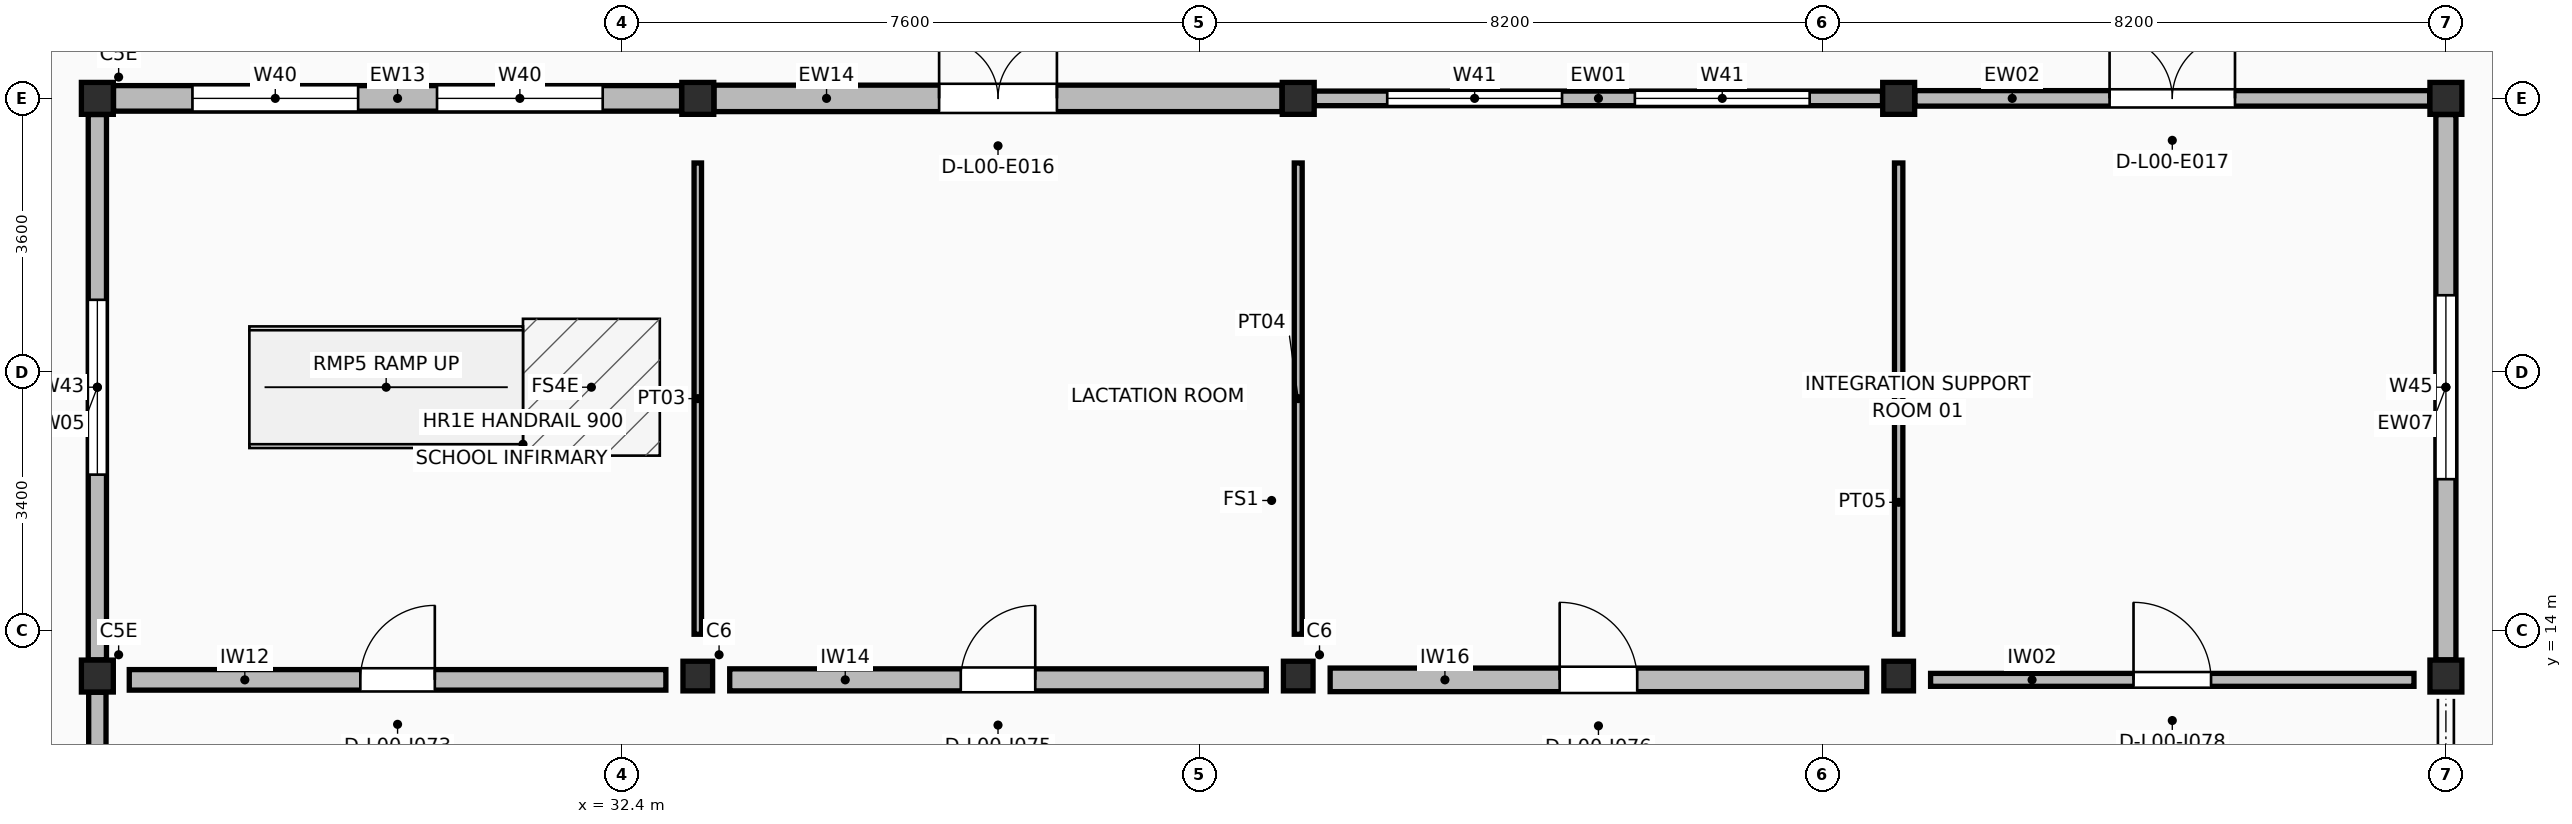
"""IFC4 building model, lengths in metres.
Left out: names, types, materials, properties, quantities, classifications, styles, units other than length and angle.
Written with IfcOpenShell. Run it as: python <this file> out.ifc"""

import sys

from ifc_helpers import new_model, si_unit, direction, frame, frame_2d, origin, origin_2d, place, context, subcontext, project, spatial, rectangle, extrude, element, fill, save


model = new_model("IFC4")
c1 = context("Model", 3, precision=1e-05, world=origin(), true_north=direction((0.0, 1.0)))
c2 = subcontext(c1, "Body", "Model", "MODEL_VIEW")
j1 = project(units=[si_unit("LENGTHUNIT", "METRE"), si_unit("PLANEANGLEUNIT", "RADIAN")], contexts=[c1])
p1 = place(None, origin())
s1 = spatial("IfcSite", under=j1, at=p1, CompositionType="ELEMENT")
p2 = place(p1, origin())
s2 = spatial("IfcBuilding", under=s1, at=p2, CompositionType="ELEMENT")
p3 = place(p2, origin())
s3 = spatial("IfcBuildingStorey", under=s2, at=p3, CompositionType="ELEMENT", Elevation=0.0)
for number, where, z_axis, x_axis in (
    (1, (25.5, 13.4, 0.0), (0.0, 0.0, 1.0), (1.0, 0.0, 0.0)),
    (2, (25.5, 21.0, 0.0), (0.0, 0.0, 1.0), (1.0, 0.0, 0.0)),
):
    element("IfcColumn", number, at=place(p3, frame(where, z_axis=z_axis, x_axis=x_axis)), inside=s3, PredefinedType="COLUMN", context=c2, shape_type="SweptSolid", body=[
        extrude(rectangle(XDim=0.42, YDim=0.42, at=origin_2d()), origin(), (0.0, 0.0, 1.0), 4.42),
    ])
p4 = place(p3, frame((33.4, 13.4, 0.0), z_axis=(0.0, 0.0, 1.0), x_axis=(1.0, 0.0, 0.0)))
e3 = element("IfcColumn", 3, at=p4, inside=s3, PredefinedType="COLUMN", context=c2, shape_type="SweptSolid", body=[
    extrude(rectangle(XDim=0.39, YDim=0.39, at=origin_2d()), origin(), (0.0, 0.0, 1.0), 4.42),
])
p5 = place(p3, frame((33.4, 21.0, 0.0), z_axis=(0.0, 0.0, 1.0), x_axis=(1.0, 0.0, 0.0)))
e4 = element("IfcColumn", 4, at=p5, inside=s3, PredefinedType="COLUMN", context=c2, shape_type="SweptSolid", body=[
    extrude(rectangle(XDim=0.42, YDim=0.42, at=origin_2d()), origin(), (0.0, 0.0, 1.0), 4.42),
])
p6 = place(p3, frame((41.3, 13.4, 0.0), z_axis=(0.0, 0.0, 1.0), x_axis=(1.0, 0.0, 0.0)))
e5 = element("IfcColumn", 5, at=p6, inside=s3, PredefinedType="COLUMN", context=c2, shape_type="SweptSolid", body=[
    extrude(rectangle(XDim=0.39, YDim=0.39, at=origin_2d()), origin(), (0.0, 0.0, 1.0), 4.42),
])
p7 = place(p3, frame((41.3, 21.0, 0.0), z_axis=(0.0, 0.0, 1.0), x_axis=(1.0, 0.0, 0.0)))
e6 = element("IfcColumn", 6, at=p7, inside=s3, PredefinedType="COLUMN", context=c2, shape_type="SweptSolid", body=[
    extrude(rectangle(XDim=0.42, YDim=0.42, at=origin_2d()), origin(), (0.0, 0.0, 1.0), 4.42),
])
p8 = place(p3, frame((49.2, 13.4, 0.0), z_axis=(0.0, 0.0, 1.0), x_axis=(1.0, 0.0, 0.0)))
e7 = element("IfcColumn", 7, at=p8, inside=s3, PredefinedType="COLUMN", context=c2, shape_type="SweptSolid", body=[
    extrude(rectangle(XDim=0.39, YDim=0.39, at=origin_2d()), origin(), (0.0, 0.0, 1.0), 4.42),
])
for number, where, z_axis, x_axis in (
    (8, (49.2, 21.0, 0.0), (0.0, 0.0, 1.0), (1.0, 0.0, 0.0)),
    (9, (56.4, 13.4, 0.0), (0.0, 0.0, 1.0), (1.0, 0.0, 0.0)),
    (10, (56.4, 21.0, 0.0), (0.0, 0.0, 1.0), (1.0, 0.0, 0.0)),
):
    element("IfcColumn", number, at=place(p3, frame(where, z_axis=z_axis, x_axis=x_axis)), inside=s3, PredefinedType="COLUMN", context=c2, shape_type="SweptSolid", body=[
        extrude(rectangle(XDim=0.42, YDim=0.42, at=origin_2d()), origin(), (0.0, 0.0, 1.0), 4.42),
    ])
p9 = place(p3, frame((25.713, 21.0, 0.0), z_axis=(0.0, 0.0, 1.0), x_axis=(1.0, 0.0, 0.0)))
e11 = element("IfcWall", 11, at=p9, inside=s3, PredefinedType="STANDARD", context=c2, shape_type="SweptSolid", body=[
    extrude(rectangle(XDim=7.474, YDim=0.336, at=frame_2d((3.737, 0.0))), origin(), (0.0, 0.0, 1.0), 3.4),
])
p10 = place(p9, frame((1.038, 0.0, 0.95)))
e12 = element("IfcOpeningElement", 12, at=p10, cuts=e11, PredefinedType="OPENING", context=c2, shape_type="SweptSolid", body=[
    extrude(rectangle(XDim=2.18, YDim=1.6, at=frame_2d((1.09, 0.8))), frame((0.0, 0.178, 0.0), z_axis=(0.0, -1.0, 0.0), x_axis=(1.0, 0.0, 0.0)), (0.0, 0.0, 1.0), 0.356),
])
p11 = place(p9, frame((4.256, 0.0, 0.95)))
e13 = element("IfcOpeningElement", 13, at=p11, cuts=e11, PredefinedType="OPENING", context=c2, shape_type="SweptSolid", body=[
    extrude(rectangle(XDim=2.18, YDim=1.6, at=frame_2d((1.09, 0.8))), frame((0.0, 0.178, 0.0), z_axis=(0.0, -1.0, 0.0), x_axis=(1.0, 0.0, 0.0)), (0.0, 0.0, 1.0), 0.356),
])
p12 = place(p3, frame((33.613, 21.0, 0.0), z_axis=(0.0, 0.0, 1.0), x_axis=(1.0, 0.0, 0.0)))
e14 = element("IfcWall", 14, at=p12, inside=s3, PredefinedType="STANDARD", context=c2, shape_type="SweptSolid", body=[
    extrude(rectangle(XDim=7.474, YDim=0.348, at=frame_2d((3.737, 0.0))), origin(), (0.0, 0.0, 1.0), 3.4),
])
p13 = place(p12, frame((2.962, 0.0, 0.0)))
e15 = element("IfcOpeningElement", 15, at=p13, cuts=e14, PredefinedType="OPENING", context=c2, shape_type="SweptSolid", body=[
    extrude(rectangle(XDim=1.55, YDim=2.22, at=frame_2d((0.775, 1.11))), frame((0.0, 0.184, 0.0), z_axis=(0.0, -1.0, 0.0), x_axis=(1.0, 0.0, 0.0)), (0.0, 0.0, 1.0), 0.368),
])
p14 = place(p3, frame((41.513, 21.0, 0.0), z_axis=(0.0, 0.0, 1.0), x_axis=(1.0, 0.0, 0.0)))
e16 = element("IfcWall", 16, at=p14, inside=s3, PredefinedType="STANDARD", context=c2, shape_type="SweptSolid", body=[
    extrude(rectangle(XDim=7.474, YDim=0.192, at=frame_2d((3.737, 0.0))), origin(), (0.0, 0.0, 1.0), 3.4),
])
p15 = place(p14, frame((0.958, 0.0, 0.95)))
e17 = element("IfcOpeningElement", 17, at=p15, cuts=e16, PredefinedType="OPENING", context=c2, shape_type="SweptSolid", body=[
    extrude(rectangle(XDim=2.3, YDim=1.15, at=frame_2d((1.15, 0.575))), frame((0.0, 0.106, 0.0), z_axis=(0.0, -1.0, 0.0), x_axis=(1.0, 0.0, 0.0)), (0.0, 0.0, 1.0), 0.212),
])
p16 = place(p14, frame((4.216, 0.0, 0.95)))
e18 = element("IfcOpeningElement", 18, at=p16, cuts=e16, PredefinedType="OPENING", context=c2, shape_type="SweptSolid", body=[
    extrude(rectangle(XDim=2.3, YDim=1.15, at=frame_2d((1.15, 0.575))), frame((0.0, 0.106, 0.0), z_axis=(0.0, -1.0, 0.0), x_axis=(1.0, 0.0, 0.0)), (0.0, 0.0, 1.0), 0.212),
])
p17 = place(p3, frame((49.413, 21.0, 0.0), z_axis=(0.0, 0.0, 1.0), x_axis=(1.0, 0.0, 0.0)))
e19 = element("IfcWall", 19, at=p17, inside=s3, PredefinedType="STANDARD", context=c2, shape_type="SweptSolid", body=[
    extrude(rectangle(XDim=6.774, YDim=0.204, at=frame_2d((3.387, 0.0))), origin(), (0.0, 0.0, 1.0), 3.4),
])
p18 = place(p17, frame((2.562, 0.0, 0.0)))
e20 = element("IfcOpeningElement", 20, at=p18, cuts=e19, PredefinedType="OPENING", context=c2, shape_type="SweptSolid", body=[
    extrude(rectangle(XDim=1.65, YDim=2.25, at=frame_2d((0.825, 1.125))), frame((0.0, 0.112, 0.0), z_axis=(0.0, -1.0, 0.0), x_axis=(1.0, 0.0, 0.0)), (0.0, 0.0, 1.0), 0.224),
])
p19 = place(p3, frame((25.5, 10.413, 0.0), z_axis=(0.0, 0.0, 1.0), x_axis=(0.0, 1.0, 0.0)))
e21 = element("IfcWall", 21, at=p19, inside=s3, PredefinedType="STANDARD", context=c2, shape_type="SweptSolid", body=[
    extrude(rectangle(XDim=2.774, YDim=0.228, at=frame_2d((1.387, 0.0))), origin(), (0.0, 0.0, 1.0), 3.4),
])
p20 = place(p19, frame((0.857, 0.0, 0.0)))
e22 = element("IfcOpeningElement", 22, at=p20, cuts=e21, PredefinedType="OPENING", context=c2, shape_type="SweptSolid", body=[
    extrude(rectangle(XDim=1.06, YDim=2.18, at=frame_2d((0.53, 1.09))), frame((0.0, 0.124, 0.0), z_axis=(0.0, -1.0, 0.0), x_axis=(1.0, 0.0, 0.0)), (0.0, 0.0, 1.0), 0.248),
])
p21 = place(p3, frame((25.5, 13.613, 0.0), z_axis=(0.0, 0.0, 1.0), x_axis=(0.0, 1.0, 0.0)))
e23 = element("IfcWall", 23, at=p21, inside=s3, PredefinedType="STANDARD", context=c2, shape_type="SweptSolid", body=[
    extrude(rectangle(XDim=7.174, YDim=0.24, at=frame_2d((3.587, 0.0))), origin(), (0.0, 0.0, 1.0), 3.4),
])
p22 = place(p21, frame((2.437, 0.0, 0.95)))
e24 = element("IfcOpeningElement", 24, at=p22, cuts=e23, PredefinedType="OPENING", context=c2, shape_type="SweptSolid", body=[
    extrude(rectangle(XDim=2.3, YDim=1.45, at=frame_2d((1.15, 0.725))), frame((0.0, 0.13, 0.0), z_axis=(0.0, -1.0, 0.0), x_axis=(1.0, 0.0, 0.0)), (0.0, 0.0, 1.0), 0.26),
])
p23 = place(p3, frame((56.4, 13.613, 0.0), z_axis=(0.0, 0.0, 1.0), x_axis=(0.0, 1.0, 0.0)))
e25 = element("IfcWall", 25, at=p23, inside=s3, PredefinedType="STANDARD", context=c2, shape_type="SweptSolid", body=[
    extrude(rectangle(XDim=7.174, YDim=0.264, at=frame_2d((3.587, 0.0))), origin(), (0.0, 0.0, 1.0), 3.4),
])
p24 = place(p23, frame((2.377, 0.0, 0.95)))
e26 = element("IfcOpeningElement", 26, at=p24, cuts=e25, PredefinedType="OPENING", context=c2, shape_type="SweptSolid", body=[
    extrude(rectangle(XDim=2.42, YDim=1.15, at=frame_2d((1.21, 0.575))), frame((0.0, 0.142, 0.0), z_axis=(0.0, -1.0, 0.0), x_axis=(1.0, 0.0, 0.0)), (0.0, 0.0, 1.0), 0.284),
])
p25 = place(p3, frame((25.92, 13.35, 0.0), z_axis=(0.0, 0.0, 1.0), x_axis=(1.0, 0.0, 0.0)))
e27 = element("IfcWall", 27, at=p25, inside=s3, PredefinedType="STANDARD", context=c2, shape_type="SweptSolid", body=[
    extrude(rectangle(XDim=7.06, YDim=0.27, at=frame_2d((3.53, 0.0))), origin(), (0.0, 0.0, 1.0), 3.38),
])
p26 = place(p25, frame((3.04, 0.0, 0.0)))
e28 = element("IfcOpeningElement", 28, at=p26, cuts=e27, PredefinedType="OPENING", context=c2, shape_type="SweptSolid", body=[
    extrude(rectangle(XDim=0.98, YDim=2.12, at=frame_2d((0.49, 1.06))), frame((0.0, 0.145, 0.0), z_axis=(0.0, -1.0, 0.0), x_axis=(1.0, 0.0, 0.0)), (0.0, 0.0, 1.0), 0.29),
])
p27 = place(p3, frame((33.82, 13.35, 0.0), z_axis=(0.0, 0.0, 1.0), x_axis=(1.0, 0.0, 0.0)))
e29 = element("IfcWall", 29, at=p27, inside=s3, PredefinedType="STANDARD", context=c2, shape_type="SweptSolid", body=[
    extrude(rectangle(XDim=7.06, YDim=0.29, at=frame_2d((3.53, 0.0))), origin(), (0.0, 0.0, 1.0), 3.38),
])
p28 = place(p27, frame((3.04, 0.0, 0.0)))
e30 = element("IfcOpeningElement", 30, at=p28, cuts=e29, PredefinedType="OPENING", context=c2, shape_type="SweptSolid", body=[
    extrude(rectangle(XDim=0.98, YDim=2.24, at=frame_2d((0.49, 1.12))), frame((0.0, 0.155, 0.0), z_axis=(0.0, -1.0, 0.0), x_axis=(1.0, 0.0, 0.0)), (0.0, 0.0, 1.0), 0.31),
])
p29 = place(p3, frame((41.72, 13.35, 0.0), z_axis=(0.0, 0.0, 1.0), x_axis=(1.0, 0.0, 0.0)))
e31 = element("IfcWall", 31, at=p29, inside=s3, PredefinedType="STANDARD", context=c2, shape_type="SweptSolid", body=[
    extrude(rectangle(XDim=7.06, YDim=0.31, at=frame_2d((3.53, 0.0))), origin(), (0.0, 0.0, 1.0), 3.38),
])
p30 = place(p29, frame((3.02, 0.0, 0.0)))
e32 = element("IfcOpeningElement", 32, at=p30, cuts=e31, PredefinedType="OPENING", context=c2, shape_type="SweptSolid", body=[
    extrude(rectangle(XDim=1.02, YDim=2.06, at=frame_2d((0.51, 1.03))), frame((0.0, 0.165, 0.0), z_axis=(0.0, -1.0, 0.0), x_axis=(1.0, 0.0, 0.0)), (0.0, 0.0, 1.0), 0.33),
])
p31 = place(p3, frame((49.62, 13.35, 0.0), z_axis=(0.0, 0.0, 1.0), x_axis=(1.0, 0.0, 0.0)))
e33 = element("IfcWall", 33, at=p31, inside=s3, PredefinedType="STANDARD", context=c2, shape_type="SweptSolid", body=[
    extrude(rectangle(XDim=6.36, YDim=0.17, at=frame_2d((3.18, 0.0))), origin(), (0.0, 0.0, 1.0), 3.38),
])
p32 = place(p31, frame((2.67, 0.0, 0.0)))
e34 = element("IfcOpeningElement", 34, at=p32, cuts=e33, PredefinedType="OPENING", context=c2, shape_type="SweptSolid", body=[
    extrude(rectangle(XDim=1.02, YDim=2.18, at=frame_2d((0.51, 1.09))), frame((0.0, 0.095, 0.0), z_axis=(0.0, -1.0, 0.0), x_axis=(1.0, 0.0, 0.0)), (0.0, 0.0, 1.0), 0.19),
])
p33 = place(p3, frame((33.4, 13.95, 0.0), z_axis=(0.0, 0.0, 1.0), x_axis=(0.0, 1.0, 0.0)))
e35 = element("IfcWall", 35, at=p33, inside=s3, PredefinedType="PARTITIONING", context=c2, shape_type="SweptSolid", body=[
    extrude(rectangle(XDim=6.2, YDim=0.098, at=frame_2d((3.1, 0.0))), origin(), (0.0, 0.0, 1.0), 3.38),
])
p34 = place(p3, frame((41.3, 13.95, 0.0), z_axis=(0.0, 0.0, 1.0), x_axis=(0.0, 1.0, 0.0)))
e36 = element("IfcWall", 36, at=p34, inside=s3, PredefinedType="PARTITIONING", context=c2, shape_type="SweptSolid", body=[
    extrude(rectangle(XDim=6.2, YDim=0.104, at=frame_2d((3.1, 0.0))), origin(), (0.0, 0.0, 1.0), 3.38),
])
p35 = place(p3, frame((49.2, 13.95, 0.0), z_axis=(0.0, 0.0, 1.0), x_axis=(0.0, 1.0, 0.0)))
e37 = element("IfcWall", 37, at=p35, inside=s3, PredefinedType="PARTITIONING", context=c2, shape_type="SweptSolid", body=[
    extrude(rectangle(XDim=6.2, YDim=0.11, at=frame_2d((3.1, 0.0))), origin(), (0.0, 0.0, 1.0), 3.38),
])
p36 = place(p10, origin())
e38 = element("IfcWindow", 38, at=p36, inside=s3, PartitioningType="SINGLE_PANEL", PredefinedType="WINDOW", context=c2, shape_type="SweptSolid", body=[
    extrude(rectangle(XDim=2.18, YDim=1.6, at=frame_2d((1.09, 0.8))), frame((0.0, 0.03, 0.0), z_axis=(0.0, -1.0, 0.0), x_axis=(1.0, 0.0, 0.0)), (0.0, 0.0, 1.0), 0.06),
])
fill(e12, e38)
p37 = place(p11, origin())
e39 = element("IfcWindow", 39, at=p37, inside=s3, PartitioningType="SINGLE_PANEL", PredefinedType="WINDOW", context=c2, shape_type="SweptSolid", body=[
    extrude(rectangle(XDim=2.18, YDim=1.6, at=frame_2d((1.09, 0.8))), frame((0.0, 0.03, 0.0), z_axis=(0.0, -1.0, 0.0), x_axis=(1.0, 0.0, 0.0)), (0.0, 0.0, 1.0), 0.06),
])
fill(e13, e39)
p38 = place(p13, origin())
e40 = element("IfcDoor", 40, at=p38, inside=s3, OperationType="DOUBLE_DOOR_SINGLE_SWING", PredefinedType="DOOR", context=c2, shape_type="SweptSolid", body=[
    extrude(rectangle(XDim=1.55, YDim=2.22, at=frame_2d((0.775, 1.11))), frame((0.0, 0.025, 0.0), z_axis=(0.0, -1.0, 0.0), x_axis=(1.0, 0.0, 0.0)), (0.0, 0.0, 1.0), 0.05),
])
fill(e15, e40)
p39 = place(p15, origin())
e41 = element("IfcWindow", 41, at=p39, inside=s3, PartitioningType="SINGLE_PANEL", PredefinedType="WINDOW", context=c2, shape_type="SweptSolid", body=[
    extrude(rectangle(XDim=2.3, YDim=1.15, at=frame_2d((1.15, 0.575))), frame((0.0, 0.03, 0.0), z_axis=(0.0, -1.0, 0.0), x_axis=(1.0, 0.0, 0.0)), (0.0, 0.0, 1.0), 0.06),
])
fill(e17, e41)
p40 = place(p16, origin())
e42 = element("IfcWindow", 42, at=p40, inside=s3, PartitioningType="SINGLE_PANEL", PredefinedType="WINDOW", context=c2, shape_type="SweptSolid", body=[
    extrude(rectangle(XDim=2.3, YDim=1.15, at=frame_2d((1.15, 0.575))), frame((0.0, 0.03, 0.0), z_axis=(0.0, -1.0, 0.0), x_axis=(1.0, 0.0, 0.0)), (0.0, 0.0, 1.0), 0.06),
])
fill(e18, e42)
p41 = place(p18, origin())
e43 = element("IfcDoor", 43, at=p41, inside=s3, OperationType="DOUBLE_DOOR_SINGLE_SWING", PredefinedType="DOOR", context=c2, shape_type="SweptSolid", body=[
    extrude(rectangle(XDim=1.65, YDim=2.25, at=frame_2d((0.825, 1.125))), frame((0.0, 0.025, 0.0), z_axis=(0.0, -1.0, 0.0), x_axis=(1.0, 0.0, 0.0)), (0.0, 0.0, 1.0), 0.05),
])
fill(e20, e43)
p42 = place(p22, origin())
e44 = element("IfcWindow", 44, at=p42, inside=s3, PartitioningType="SINGLE_PANEL", PredefinedType="WINDOW", context=c2, shape_type="SweptSolid", body=[
    extrude(rectangle(XDim=2.3, YDim=1.45, at=frame_2d((1.15, 0.725))), frame((0.0, 0.03, 0.0), z_axis=(0.0, -1.0, 0.0), x_axis=(1.0, 0.0, 0.0)), (0.0, 0.0, 1.0), 0.06),
])
fill(e24, e44)
p43 = place(p24, origin())
e45 = element("IfcWindow", 45, at=p43, inside=s3, PartitioningType="SINGLE_PANEL", PredefinedType="WINDOW", context=c2, shape_type="SweptSolid", body=[
    extrude(rectangle(XDim=2.42, YDim=1.15, at=frame_2d((1.21, 0.575))), frame((0.0, 0.03, 0.0), z_axis=(0.0, -1.0, 0.0), x_axis=(1.0, 0.0, 0.0)), (0.0, 0.0, 1.0), 0.06),
])
fill(e26, e45)
p44 = place(p26, frame((0.98, 0.0, 0.0), z_axis=(0.0, 0.0, 1.0), x_axis=(-1.0, 0.0, 0.0)))
e46 = element("IfcDoor", 46, at=p44, inside=s3, OperationType="SINGLE_SWING_RIGHT", PredefinedType="DOOR", context=c2, shape_type="SweptSolid", body=[
    extrude(rectangle(XDim=0.98, YDim=2.12, at=frame_2d((0.49, 1.06))), frame((0.0, 0.025, 0.0), z_axis=(0.0, -1.0, 0.0), x_axis=(1.0, 0.0, 0.0)), (0.0, 0.0, 1.0), 0.05),
])
fill(e28, e46)
p45 = place(p28, frame((0.98, 0.0, 0.0), z_axis=(0.0, 0.0, 1.0), x_axis=(-1.0, 0.0, 0.0)))
e47 = element("IfcDoor", 47, at=p45, inside=s3, OperationType="SINGLE_SWING_RIGHT", PredefinedType="DOOR", context=c2, shape_type="SweptSolid", body=[
    extrude(rectangle(XDim=0.98, YDim=2.24, at=frame_2d((0.49, 1.12))), frame((0.0, 0.025, 0.0), z_axis=(0.0, -1.0, 0.0), x_axis=(1.0, 0.0, 0.0)), (0.0, 0.0, 1.0), 0.05),
])
fill(e30, e47)
p46 = place(p30, frame((1.02, 0.0, 0.0), z_axis=(0.0, 0.0, 1.0), x_axis=(-1.0, 0.0, 0.0)))
e48 = element("IfcDoor", 48, at=p46, inside=s3, OperationType="SINGLE_SWING_LEFT", PredefinedType="DOOR", context=c2, shape_type="SweptSolid", body=[
    extrude(rectangle(XDim=1.02, YDim=2.06, at=frame_2d((0.51, 1.03))), frame((0.0, 0.025, 0.0), z_axis=(0.0, -1.0, 0.0), x_axis=(1.0, 0.0, 0.0)), (0.0, 0.0, 1.0), 0.05),
])
fill(e32, e48)
p47 = place(p32, frame((1.02, 0.0, 0.0), z_axis=(0.0, 0.0, 1.0), x_axis=(-1.0, 0.0, 0.0)))
e49 = element("IfcDoor", 49, at=p47, inside=s3, OperationType="SINGLE_SWING_LEFT", PredefinedType="DOOR", context=c2, shape_type="SweptSolid", body=[
    extrude(rectangle(XDim=1.02, YDim=2.18, at=frame_2d((0.51, 1.09))), frame((0.0, 0.025, 0.0), z_axis=(0.0, -1.0, 0.0), x_axis=(1.0, 0.0, 0.0)), (0.0, 0.0, 1.0), 0.05),
])
fill(e34, e49)
save(model, sys.argv[1])
